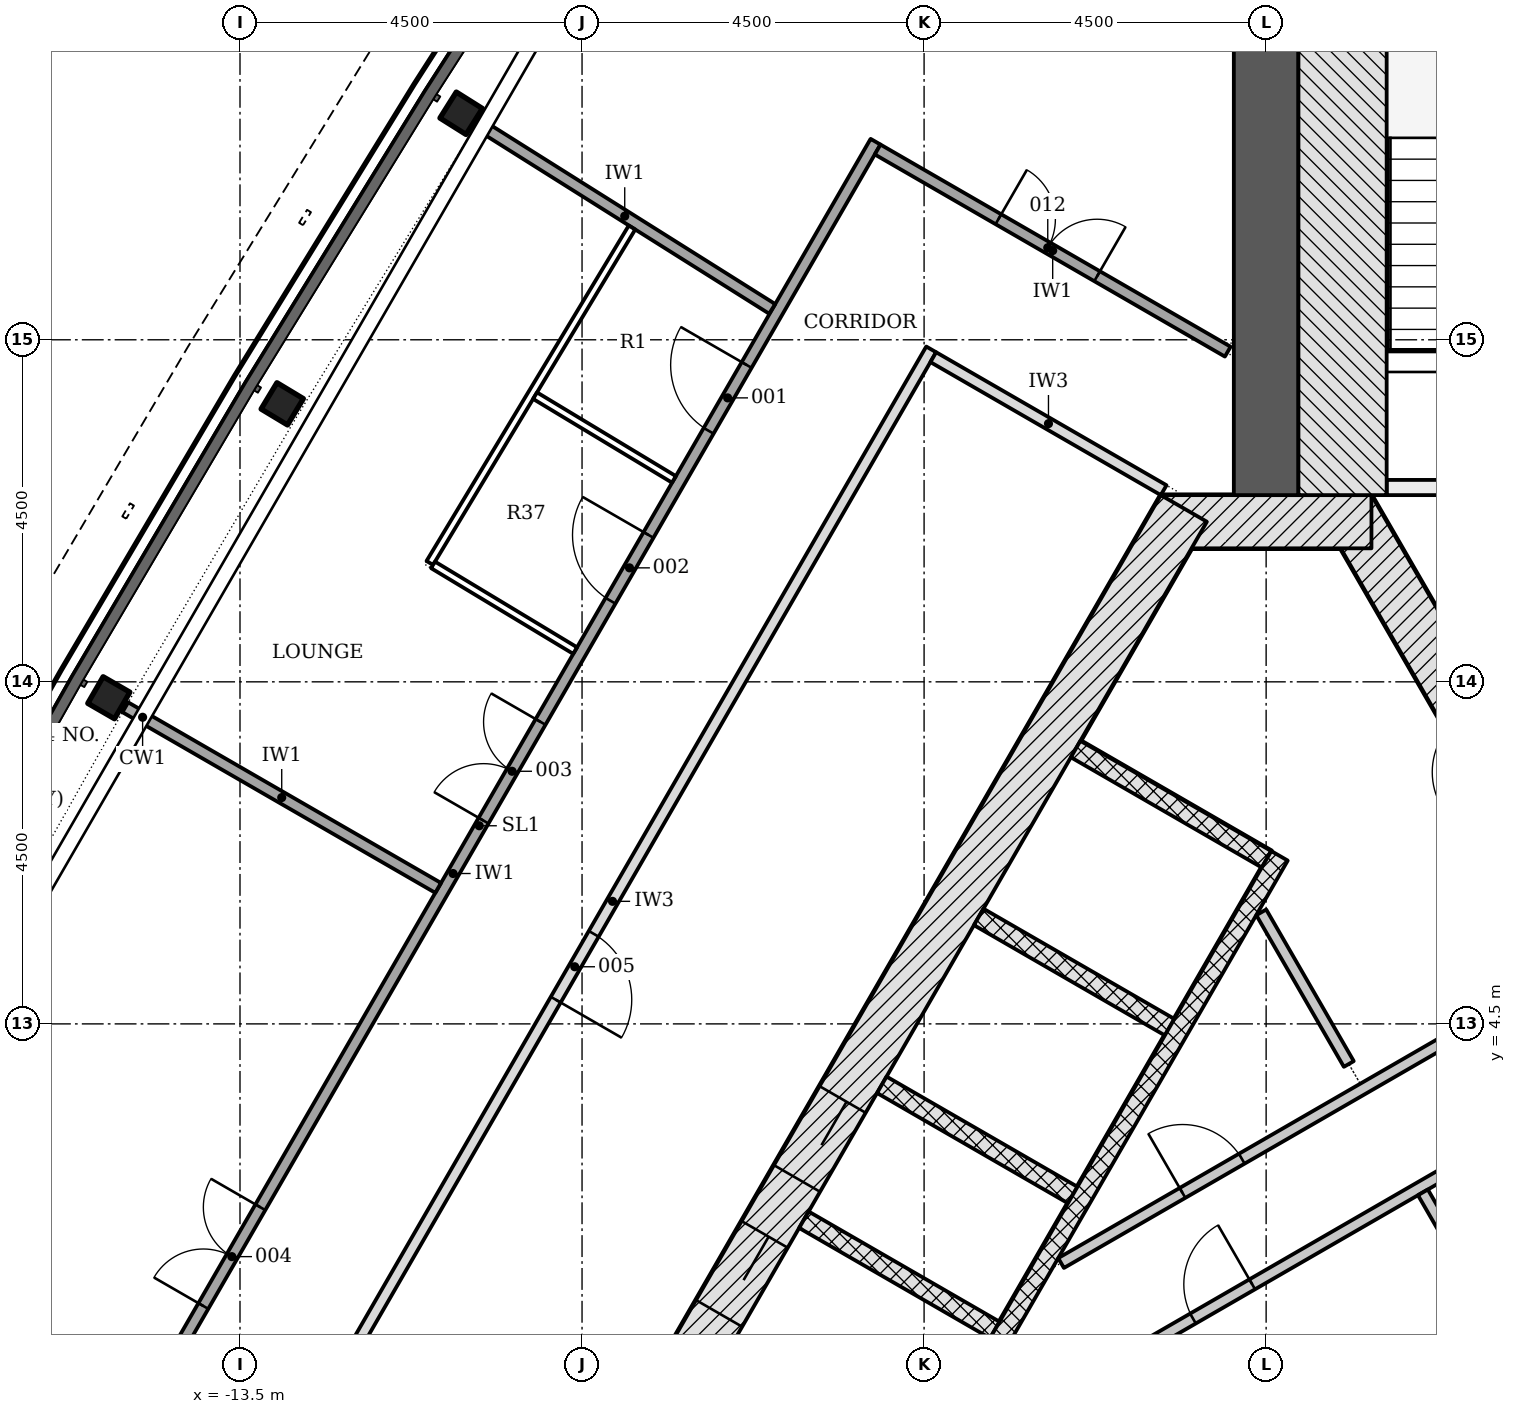
"""IFC4 building model, lengths in metres.
Left out: names, types, materials, properties, quantities, classifications, styles, units other than length and angle.
Written with IfcOpenShell. Run it as: python <this file> out.ifc"""

import sys

from ifc_helpers import new_model, si_unit, direction, frame, frame_2d, origin, origin_2d, place, context, subcontext, project, spatial, polyline, rectangle, i_section, outline, extrude, element, fill, save


model = new_model("IFC4")
c1 = context("Model", 3, precision=1e-05, world=origin(), true_north=direction((0.0, 1.0)))
c2 = subcontext(c1, "Body", "Model", "MODEL_VIEW")
j1 = project(units=[si_unit("LENGTHUNIT", "METRE"), si_unit("PLANEANGLEUNIT", "RADIAN")], contexts=[c1])
p1 = place(None, origin())
s1 = spatial("IfcSite", under=j1, at=p1, CompositionType="ELEMENT")
p2 = place(p1, origin())
s2 = spatial("IfcBuilding", under=s1, at=p2, CompositionType="ELEMENT")
p3 = place(p2, frame((0.0, 0.0, 45.6)))
s3 = spatial("IfcBuildingStorey", under=s2, at=p3, CompositionType="ELEMENT", Elevation=45.6)
p4 = place(p3, frame((10.311, -4.703, -0.2), z_axis=(0.0, 0.0, 1.0), x_axis=(-0.500001446645, 0.866024568562, 0.0)))
e1 = element("IfcWall", 1, at=p4, inside=s3, PredefinedType="SHEAR", context=c2, shape_type="SweptSolid", body=[
    extrude(rectangle(XDim=18.458, YDim=0.7, at=frame_2d((9.229, 0.0))), origin(), (0.0, 0.0, 1.0), 3.6),
])
p5 = place(p4, frame((10.5, 0.0, 0.2)))
e2 = element("IfcOpeningElement", 2, at=p5, cuts=e1, PredefinedType="OPENING", context=c2, shape_type="SweptSolid", body=[
    extrude(rectangle(XDim=1.0, YDim=2.1, at=frame_2d((0.5, 1.05))), frame((0.0, 0.36, 0.0), z_axis=(0.0, -1.0, 0.0), x_axis=(1.0, 0.0, 0.0)), (0.0, 0.0, 1.0), 0.72),
])
p6 = place(p4, frame((4.877, 0.0, 0.2)))
e3 = element("IfcOpeningElement", 3, at=p6, cuts=e1, PredefinedType="OPENING", context=c2, shape_type="SweptSolid", body=[
    extrude(rectangle(XDim=0.9, YDim=2.1, at=frame_2d((0.45, 1.05))), frame((0.0, 0.36, 0.0), z_axis=(0.0, -1.0, 0.0), x_axis=(1.0, 0.0, 0.0)), (0.0, 0.0, 1.0), 0.72),
])
p7 = place(p4, frame((14.452, 0.0, 0.2)))
e4 = element("IfcOpeningElement", 4, at=p7, cuts=e1, PredefinedType="OPENING", context=c2, shape_type="SweptSolid", body=[
    extrude(rectangle(XDim=0.9, YDim=2.1, at=frame_2d((0.45, 1.05))), frame((0.0, 0.36, 0.0), z_axis=(0.0, -1.0, 0.0), x_axis=(1.0, 0.0, 0.0)), (0.0, 0.0, 1.0), 0.72),
])
p8 = place(p3, frame((1.386, 11.106, -0.2), z_axis=(0.0, 0.0, 1.0), x_axis=(-1.0, 0.0, 0.0)))
e5 = element("IfcWall", 5, at=p8, inside=s3, PredefinedType="SHEAR", context=c2, shape_type="SweptSolid", body=[
    extrude(rectangle(XDim=2.771, YDim=0.7, at=frame_2d((1.386, 0.0))), origin(), (0.0, 0.0, 1.0), 3.6),
])
p9 = place(p3, frame((-1.083, 11.281, -0.2), z_axis=(0.0, 0.0, 1.0), x_axis=(-0.500001446645, -0.866024568562, 0.0)))
e6 = element("IfcWall", 6, at=p9, inside=s3, PredefinedType="SHEAR", context=c2, shape_type="SweptSolid", body=[
    extrude(rectangle(XDim=18.458, YDim=0.7, at=frame_2d((9.229, 0.0))), origin(), (0.0, 0.0, 1.0), 3.6),
])
p10 = place(p9, frame((8.979, 0.0, 0.2)))
e7 = element("IfcOpeningElement", 7, at=p10, cuts=e6, PredefinedType="OPENING", context=c2, shape_type="SweptSolid", body=[
    extrude(rectangle(XDim=1.2, YDim=2.1, at=frame_2d((0.6, 1.05))), frame((0.0, 0.36, 0.0), z_axis=(0.0, -1.0, 0.0), x_axis=(1.0, 0.0, 0.0)), (0.0, 0.0, 1.0), 0.72),
])
p11 = place(p9, frame((11.029, 0.0, 0.2)))
e8 = element("IfcOpeningElement", 8, at=p11, cuts=e6, PredefinedType="OPENING", context=c2, shape_type="SweptSolid", body=[
    extrude(rectangle(XDim=1.2, YDim=2.1, at=frame_2d((0.6, 1.05))), frame((0.0, 0.36, 0.0), z_axis=(0.0, -1.0, 0.0), x_axis=(1.0, 0.0, 0.0)), (0.0, 0.0, 1.0), 0.72),
])
p12 = place(p3, frame((0.0, 11.456, -0.2), z_axis=(0.0, 0.0, 1.0), x_axis=(0.0, 1.0, 0.0)))
e9 = element("IfcWall", 9, at=p12, inside=s3, PredefinedType="SHEAR", context=c2, shape_type="SweptSolid", body=[
    extrude(rectangle(XDim=14.014, YDim=0.85, at=frame_2d((7.007, 0.0))), origin(), (0.0, 0.0, 1.0), 3.6),
])
for number, where, z_axis, x_axis in (
    (10, (-10.59, 16.48, -0.2), (0.0, 0.0, 1.0), (-0.532, -0.846, 0.0)),
    (11, (-12.944, 12.657, -0.2), (0.0, 0.0, 1.0), (-0.516, -0.856, 0.0)),
    (12, (-15.226, 8.791, -0.2), (0.0, 0.0, 1.0), (-0.5, -0.866, 0.0)),
):
    element("IfcColumn", number, at=place(p3, frame(where, z_axis=z_axis, x_axis=x_axis)), inside=s3, PredefinedType="COLUMN", context=c2, shape_type="SweptSolid", body=[
        extrude(i_section(OverallWidth=0.404, OverallDepth=0.406, WebThickness=0.027, FlangeThickness=0.044, FilletRadius=0.015, at=origin_2d()), origin(), (0.0, 0.0, 1.0), 3.6),
    ])
p13 = place(p3, frame((-2.506, 8.115, -0.2), z_axis=(0.0, 0.0, 1.0), x_axis=(0.865996321171, -0.50005036918, 0.0)))
e13 = element("IfcWall", 13, at=p13, inside=s3, PredefinedType="PARTITIONING", context=c2, shape_type="SweptSolid", body=[
    extrude(rectangle(XDim=2.9, YDim=0.25, at=frame_2d((1.45, 0.0))), origin(), (0.0, 0.0, 1.0), 3.6),
])
for number, where, z_axis, x_axis in (
    (14, (-3.781, 5.907, -0.2), (0.0, 0.0, 1.0), (0.866, -0.5, 0.0)),
    (15, (-5.056, 3.699, -0.2), (0.0, 0.0, 1.0), (0.866, -0.5, 0.0)),
    (16, (-6.081, 1.923, -0.2), (0.0, 0.0, 1.0), (0.866, -0.5, 0.0)),
):
    element("IfcWall", number, at=place(p3, frame(where, z_axis=z_axis, x_axis=x_axis)), inside=s3, PredefinedType="PARTITIONING", context=c2, shape_type="SweptSolid", body=[
        extrude(rectangle(XDim=2.9, YDim=0.25, at=frame_2d((1.45, 0.0))), origin(), (0.0, 0.0, 1.0), 3.6),
    ])
p14 = place(p3, frame((0.176, 6.711, 0.0), z_axis=(0.0, 0.0, 1.0), x_axis=(-0.500004227369, -0.866022963098, 0.0)))
e17 = element("IfcWall", 17, at=p14, inside=s3, PredefinedType="PARTITIONING", context=c2, shape_type="SweptSolid", body=[
    extrude(rectangle(XDim=11.8, YDim=0.25, at=frame_2d((5.9, 0.0))), origin(), (0.0, 0.0, 1.0), 3.4),
])
p15 = place(p3, frame((-4.198, -1.244, 0.0), z_axis=(0.0, 0.0, 1.0), x_axis=(0.866020798945, 0.500007975732, 0.0)))
e18 = element("IfcWall", 18, at=p15, inside=s3, PredefinedType="PARTITIONING", context=c2, shape_type="SweptSolid", body=[
    extrude(rectangle(XDim=10.486, YDim=0.15, at=frame_2d((5.243, 0.0))), origin(), (0.0, 0.0, 1.0), 3.4),
])
p16 = place(p15, frame((3.736, 0.0, 0.0)))
e19 = element("IfcOpeningElement", 19, at=p16, cuts=e18, PredefinedType="OPENING", context=c2, shape_type="SweptSolid", body=[
    extrude(rectangle(XDim=0.9, YDim=2.1, at=frame_2d((0.45, 1.05))), frame((0.0, 0.085, 0.0), z_axis=(0.0, -1.0, 0.0), x_axis=(1.0, 0.0, 0.0)), (0.0, 0.0, 1.0), 0.17),
])
p17 = place(p15, frame((0.144, 0.0, 0.0)))
e20 = element("IfcOpeningElement", 20, at=p17, cuts=e18, PredefinedType="OPENING", context=c2, shape_type="SweptSolid", body=[
    extrude(rectangle(XDim=0.9, YDim=2.1, at=frame_2d((0.45, 1.05))), frame((0.0, 0.085, 0.0), z_axis=(0.0, -1.0, 0.0), x_axis=(1.0, 0.0, 0.0)), (0.0, 0.0, 1.0), 0.17),
])
p18 = place(p3, frame((5.367, -3.439, 0.0), z_axis=(0.0, 0.0, 1.0), x_axis=(-0.499981499682, 0.866036084685, 0.0)))
e21 = element("IfcWall", 21, at=p18, inside=s3, PredefinedType="PARTITIONING", context=c2, shape_type="SweptSolid", body=[
    extrude(rectangle(XDim=6.608, YDim=0.15, at=frame_2d((3.304, 0.0))), origin(), (0.0, 0.0, 1.0), 3.4),
])
p19 = place(p3, frame((-2.698, 1.354, 0.0), z_axis=(0.0, 0.0, 1.0), x_axis=(0.866021157486, 0.500007354732, 0.0)))
e22 = element("IfcWall", 22, at=p19, inside=s3, PredefinedType="PARTITIONING", context=c2, shape_type="SweptSolid", body=[
    extrude(rectangle(XDim=7.888, YDim=0.15, at=frame_2d((3.944, 0.0))), origin(), (0.0, 0.0, 1.0), 3.4),
])
p20 = place(p19, frame((1.845, 0.0, 0.0)))
e23 = element("IfcOpeningElement", 23, at=p20, cuts=e22, PredefinedType="OPENING", context=c2, shape_type="SweptSolid", body=[
    extrude(rectangle(XDim=0.9, YDim=2.1, at=frame_2d((0.45, 1.05))), frame((0.0, 0.085, 0.0), z_axis=(0.0, -1.0, 0.0), x_axis=(1.0, 0.0, 0.0)), (0.0, 0.0, 1.0), 0.17),
])
p21 = place(p3, frame((1.088, 3.972, 0.0), z_axis=(0.0, 0.0, 1.0), x_axis=(-0.500116913307, 0.865957893332, 0.0)))
e24 = element("IfcWall", 24, at=p21, inside=s3, PredefinedType="PARTITIONING", context=c2, shape_type="SweptSolid", body=[
    extrude(rectangle(XDim=2.304, YDim=0.15, at=frame_2d((1.152, 0.0))), origin(), (0.0, 0.0, 1.0), 3.4),
])
p22 = place(p3, frame((5.135, 11.556, -0.2), z_axis=(0.0, 0.0, 1.0), x_axis=(-1.0, 0.0, 0.0)))
e25 = element("IfcWall", 25, at=p22, inside=s3, PredefinedType="SHEAR", context=c2, shape_type="SweptSolid", body=[
    extrude(rectangle(XDim=3.55, YDim=0.2, at=frame_2d((1.775, 0.0))), origin(), (0.0, 0.0, 1.0), 3.6),
])
p23 = place(p22, frame((1.175, 0.0, 0.2)))
e26 = element("IfcOpeningElement", 26, at=p23, cuts=e25, PredefinedType="OPENING", context=c2, shape_type="SweptSolid", body=[
    extrude(rectangle(XDim=1.2, YDim=2.1, at=frame_2d((0.6, 1.05))), frame((0.0, 0.11, 0.0), z_axis=(0.0, -1.0, 0.0), x_axis=(1.0, 0.0, 0.0)), (0.0, 0.0, 1.0), 0.22),
])
p24 = place(p3, frame((1.005, 11.456, -0.2), z_axis=(0.0, 0.0, 1.0), x_axis=(0.0, 1.0, 0.0)))
e27 = element("IfcWall", 27, at=p24, inside=s3, PredefinedType="SHEAR", context=c2, shape_type="SweptSolid", body=[
    extrude(rectangle(XDim=7.2, YDim=1.161, at=frame_2d((3.6, 0.0))), origin(), (0.0, 0.0, 1.0), 3.6),
])
p25 = place(p3, frame((0.0, 0.0, -0.2)))
e28 = element("IfcWall", 28, at=p25, inside=s3, PredefinedType="SHEAR", context=c2, shape_type="SweptSolid", body=[
    extrude(outline(polyline([(5.336, 17.056), (3.736, 18.656), (1.586, 18.656), (1.586, 18.456), (3.653, 18.456), (5.135, 16.974), (5.135, 17.056), (5.135, 17.056), (5.135, 17.056), (5.135, 17.056), (5.135, 17.056), (5.135, 17.056), (5.135, 17.056), (5.135, 17.056), (5.135, 17.056), (5.135, 17.056), (5.135, 17.056), (5.135, 17.056), (5.135, 17.056), (5.135, 17.056), (5.135, 17.056), (5.135, 17.056), (5.135, 17.056), (5.336, 17.056)])), origin(), (0.0, 0.0, 1.0), 3.6),
])
p26 = place(p3, frame((-16.256, -3.149, 0.0), z_axis=(0.0, 0.0, 1.0), x_axis=(0.499999683919, 0.866025586274, 0.0)))
e29 = element("IfcWall", 29, at=p26, inside=s3, PredefinedType="PARTITIONING", context=c2, shape_type="SweptSolid", body=[
    extrude(rectangle(XDim=22.234, YDim=0.15, at=frame_2d((11.117, 0.0))), origin(), (0.0, 0.0, 1.0), 2.778),
])
p27 = place(p26, frame((17.842, 0.0, 0.0)))
e30 = element("IfcOpeningElement", 30, at=p27, cuts=e29, PredefinedType="OPENING", context=c2, shape_type="SweptSolid", body=[
    extrude(rectangle(XDim=1.0, YDim=2.1, at=frame_2d((0.5, 1.05))), frame((0.0, 0.085, 0.0), z_axis=(0.0, -1.0, 0.0), x_axis=(1.0, 0.0, 0.0)), (0.0, 0.0, 1.0), 0.17),
])
p28 = place(p26, frame((15.26, 0.0, 0.0)))
e31 = element("IfcOpeningElement", 31, at=p28, cuts=e29, PredefinedType="OPENING", context=c2, shape_type="SweptSolid", body=[
    extrude(rectangle(XDim=1.0, YDim=2.1, at=frame_2d((0.5, 1.05))), frame((0.0, 0.085, 0.0), z_axis=(0.0, -1.0, 0.0), x_axis=(1.0, 0.0, 0.0)), (0.0, 0.0, 1.0), 0.17),
])
p29 = place(p26, frame((11.92, 0.0, 0.0)))
e32 = element("IfcOpeningElement", 32, at=p29, cuts=e29, PredefinedType="OPENING", context=c2, shape_type="SweptSolid", body=[
    extrude(rectangle(XDim=1.5, YDim=2.1, at=frame_2d((0.75, 1.05))), frame((0.0, 0.085, 0.0), z_axis=(0.0, -1.0, 0.0), x_axis=(1.0, 0.0, 0.0)), (0.0, 0.0, 1.0), 0.17),
])
p30 = place(p26, frame((4.547, 0.0, 0.0)))
e33 = element("IfcOpeningElement", 33, at=p30, cuts=e29, PredefinedType="OPENING", context=c2, shape_type="SweptSolid", body=[
    extrude(rectangle(XDim=1.5, YDim=2.1, at=frame_2d((0.75, 1.05))), frame((0.0, 0.085, 0.0), z_axis=(0.0, -1.0, 0.0), x_axis=(1.0, 0.0, 0.0)), (0.0, 0.0, 1.0), 0.17),
])
p31 = place(p3, frame((-4.407, 13.374, 0.0), z_axis=(0.0, 0.0, 1.0), x_axis=(-0.499997181693, -0.866027030928, 0.0)))
e34 = element("IfcWall", 34, at=p31, inside=s3, PredefinedType="PARTITIONING", context=c2, shape_type="SweptSolid", body=[
    extrude(rectangle(XDim=16.77, YDim=0.15, at=frame_2d((8.385, 0.0))), origin(), (0.0, 0.0, 1.0), 2.778),
])
p32 = place(p31, frame((8.879, 0.0, 0.0)))
e35 = element("IfcOpeningElement", 35, at=p32, cuts=e34, PredefinedType="OPENING", context=c2, shape_type="SweptSolid", body=[
    extrude(rectangle(XDim=1.0, YDim=2.1, at=frame_2d((0.5, 1.05))), frame((0.0, 0.085, 0.0), z_axis=(0.0, -1.0, 0.0), x_axis=(1.0, 0.0, 0.0)), (0.0, 0.0, 1.0), 0.17),
])
p33 = place(p3, frame((-5.111, 16.003, 0.0), z_axis=(0.0, 0.0, 1.0), x_axis=(0.866034245675, -0.499984685083, 0.0)))
e36 = element("IfcWall", 36, at=p33, inside=s3, PredefinedType="PARTITIONING", context=c2, shape_type="SweptSolid", body=[
    extrude(rectangle(XDim=5.319, YDim=0.15, at=frame_2d((2.66, 0.0))), origin(), (0.0, 0.0, 1.0), 3.4),
])
p34 = place(p33, frame((1.834, 0.0, 0.0)))
e37 = element("IfcOpeningElement", 37, at=p34, cuts=e36, PredefinedType="OPENING", context=c2, shape_type="SweptSolid", body=[
    extrude(rectangle(XDim=1.5, YDim=2.1, at=frame_2d((0.75, 1.05))), frame((0.0, 0.085, 0.0), z_axis=(0.0, -1.0, 0.0), x_axis=(1.0, 0.0, 0.0)), (0.0, 0.0, 1.0), 0.17),
])
p35 = place(p3, frame((-4.379, 13.271, 0.0), z_axis=(0.0, 0.0, 1.0), x_axis=(0.866019471182, -0.500010275428, 0.0)))
e38 = element("IfcWall", 38, at=p35, inside=s3, PredefinedType="PARTITIONING", context=c2, shape_type="SweptSolid", body=[
    extrude(rectangle(XDim=3.5, YDim=0.15, at=frame_2d((1.75, 0.0))), origin(), (0.0, 0.0, 1.0), 3.4),
])
p36 = place(p3, frame((-15.009, 8.666, 0.0), z_axis=(0.0, 0.0, 1.0), x_axis=(0.866028196007, -0.499995163697, 0.0)))
e39 = element("IfcWall", 39, at=p36, inside=s3, PredefinedType="PARTITIONING", context=c2, shape_type="SweptSolid", body=[
    extrude(rectangle(XDim=4.753, YDim=0.15, at=frame_2d((2.376, 0.0))), origin(), (0.0, 0.0, 1.0), 2.778),
])
p37 = place(p3, frame((-10.378, 16.347, 0.0), z_axis=(0.0, 0.0, 1.0), x_axis=(0.846489789966, -0.532404954414, 0.0)))
e40 = element("IfcWall", 40, at=p37, inside=s3, PredefinedType="PARTITIONING", context=c2, shape_type="SweptSolid", body=[
    extrude(rectangle(XDim=4.584, YDim=0.15, at=frame_2d((2.292, 0.0))), origin(), (0.0, 0.0, 1.0), 2.778),
])
p38 = place(p3, frame((-8.343, 14.977, 0.0), z_axis=(0.0, 0.0, 1.0), x_axis=(-0.516292416674, -0.856412365911, 0.0)))
e41 = element("IfcWall", 41, at=p38, inside=s3, PredefinedType="PARTITIONING", context=c2, shape_type="SweptSolid", body=[
    extrude(rectangle(XDim=5.152, YDim=0.1, at=frame_2d((2.576, 0.0))), origin(), (0.0, 0.0, 1.0), 2.778),
])
p39 = place(p3, frame((-10.96, 10.538, 0.0), z_axis=(0.0, 0.0, 1.0), x_axis=(0.856405167788, -0.516304356544, 0.0)))
e42 = element("IfcWall", 42, at=p39, inside=s3, PredefinedType="PARTITIONING", context=c2, shape_type="SweptSolid", body=[
    extrude(rectangle(XDim=2.182, YDim=0.1, at=frame_2d((1.091, 0.0))), origin(), (0.0, 0.0, 1.0), 3.4),
])
p40 = place(p3, frame((-9.618, 12.765, 0.0), z_axis=(0.0, 0.0, 1.0), x_axis=(0.856420636577, -0.51627869726, 0.0)))
e43 = element("IfcWall", 43, at=p40, inside=s3, PredefinedType="PARTITIONING", context=c2, shape_type="SweptSolid", body=[
    extrude(rectangle(XDim=2.133, YDim=0.1, at=frame_2d((1.067, 0.0))), origin(), (0.0, 0.0, 1.0), 3.4),
])
p41 = place(p10, origin())
e44 = element("IfcDoor", 44, at=p41, inside=s3, OperationType="DOUBLE_DOOR_SLIDING", PredefinedType="DOOR", context=c2, shape_type="SweptSolid", body=[
    extrude(rectangle(XDim=1.2, YDim=2.1, at=frame_2d((0.6, 1.05))), frame((0.0, 0.025, 0.0), z_axis=(0.0, -1.0, 0.0), x_axis=(1.0, 0.0, 0.0)), (0.0, 0.0, 1.0), 0.05),
])
fill(e7, e44)
p42 = place(p11, origin())
e45 = element("IfcDoor", 45, at=p42, inside=s3, OperationType="DOUBLE_DOOR_SLIDING", PredefinedType="DOOR", context=c2, shape_type="SweptSolid", body=[
    extrude(rectangle(XDim=1.2, YDim=2.1, at=frame_2d((0.6, 1.05))), frame((0.0, 0.025, 0.0), z_axis=(0.0, -1.0, 0.0), x_axis=(1.0, 0.0, 0.0)), (0.0, 0.0, 1.0), 0.05),
])
fill(e8, e45)
p43 = place(p16, origin())
e46 = element("IfcDoor", 46, at=p43, inside=s3, OperationType="SINGLE_SWING_RIGHT", PredefinedType="DOOR", context=c2, shape_type="SweptSolid", body=[
    extrude(rectangle(XDim=0.9, YDim=2.1, at=frame_2d((0.45, 1.05))), frame((0.0, 0.025, 0.0), z_axis=(0.0, -1.0, 0.0), x_axis=(1.0, 0.0, 0.0)), (0.0, 0.0, 1.0), 0.05),
])
fill(e19, e46)
p44 = place(p20, origin())
e47 = element("IfcDoor", 47, at=p44, inside=s3, OperationType="SINGLE_SWING_LEFT", PredefinedType="DOOR", context=c2, shape_type="SweptSolid", body=[
    extrude(rectangle(XDim=0.9, YDim=2.1, at=frame_2d((0.45, 1.05))), frame((0.0, 0.025, 0.0), z_axis=(0.0, -1.0, 0.0), x_axis=(1.0, 0.0, 0.0)), (0.0, 0.0, 1.0), 0.05),
])
fill(e23, e47)
p45 = place(p27, origin())
e48 = element("IfcDoor", 48, at=p45, inside=s3, OperationType="SINGLE_SWING_RIGHT", PredefinedType="DOOR", context=c2, shape_type="SweptSolid", body=[
    extrude(rectangle(XDim=1.0, YDim=2.1, at=frame_2d((0.5, 1.05))), frame((0.0, 0.025, 0.0), z_axis=(0.0, -1.0, 0.0), x_axis=(1.0, 0.0, 0.0)), (0.0, 0.0, 1.0), 0.05),
])
fill(e30, e48)
p46 = place(p28, origin())
e49 = element("IfcDoor", 49, at=p46, inside=s3, OperationType="SINGLE_SWING_RIGHT", PredefinedType="DOOR", context=c2, shape_type="SweptSolid", body=[
    extrude(rectangle(XDim=1.0, YDim=2.1, at=frame_2d((0.5, 1.05))), frame((0.0, 0.025, 0.0), z_axis=(0.0, -1.0, 0.0), x_axis=(1.0, 0.0, 0.0)), (0.0, 0.0, 1.0), 0.05),
])
fill(e31, e49)
p47 = place(p29, origin())
e50 = element("IfcDoor", 50, at=p47, inside=s3, OperationType="DOUBLE_DOOR_SINGLE_SWING", PredefinedType="DOOR", context=c2, shape_type="SweptSolid", body=[
    extrude(rectangle(XDim=1.5, YDim=2.1, at=frame_2d((0.75, 1.05))), frame((0.0, 0.025, 0.0), z_axis=(0.0, -1.0, 0.0), x_axis=(1.0, 0.0, 0.0)), (0.0, 0.0, 1.0), 0.05),
])
fill(e32, e50)
p48 = place(p30, origin())
e51 = element("IfcDoor", 51, at=p48, inside=s3, OperationType="DOUBLE_DOOR_SINGLE_SWING", PredefinedType="DOOR", context=c2, shape_type="SweptSolid", body=[
    extrude(rectangle(XDim=1.5, YDim=2.1, at=frame_2d((0.75, 1.05))), frame((0.0, 0.025, 0.0), z_axis=(0.0, -1.0, 0.0), x_axis=(1.0, 0.0, 0.0)), (0.0, 0.0, 1.0), 0.05),
])
fill(e33, e51)
p49 = place(p32, origin())
e52 = element("IfcDoor", 52, at=p49, inside=s3, OperationType="SINGLE_SWING_RIGHT", PredefinedType="DOOR", context=c2, shape_type="SweptSolid", body=[
    extrude(rectangle(XDim=1.0, YDim=2.1, at=frame_2d((0.5, 1.05))), frame((0.0, 0.025, 0.0), z_axis=(0.0, -1.0, 0.0), x_axis=(1.0, 0.0, 0.0)), (0.0, 0.0, 1.0), 0.05),
])
fill(e35, e52)
p50 = place(p34, origin())
e53 = element("IfcDoor", 53, at=p50, inside=s3, OperationType="DOUBLE_DOOR_SINGLE_SWING", PredefinedType="DOOR", context=c2, shape_type="SweptSolid", body=[
    extrude(rectangle(XDim=1.5, YDim=2.1, at=frame_2d((0.75, 1.05))), frame((0.0, 0.025, 0.0), z_axis=(0.0, -1.0, 0.0), x_axis=(1.0, 0.0, 0.0)), (0.0, 0.0, 1.0), 0.05),
])
fill(e37, e53)
save(model, sys.argv[1])
